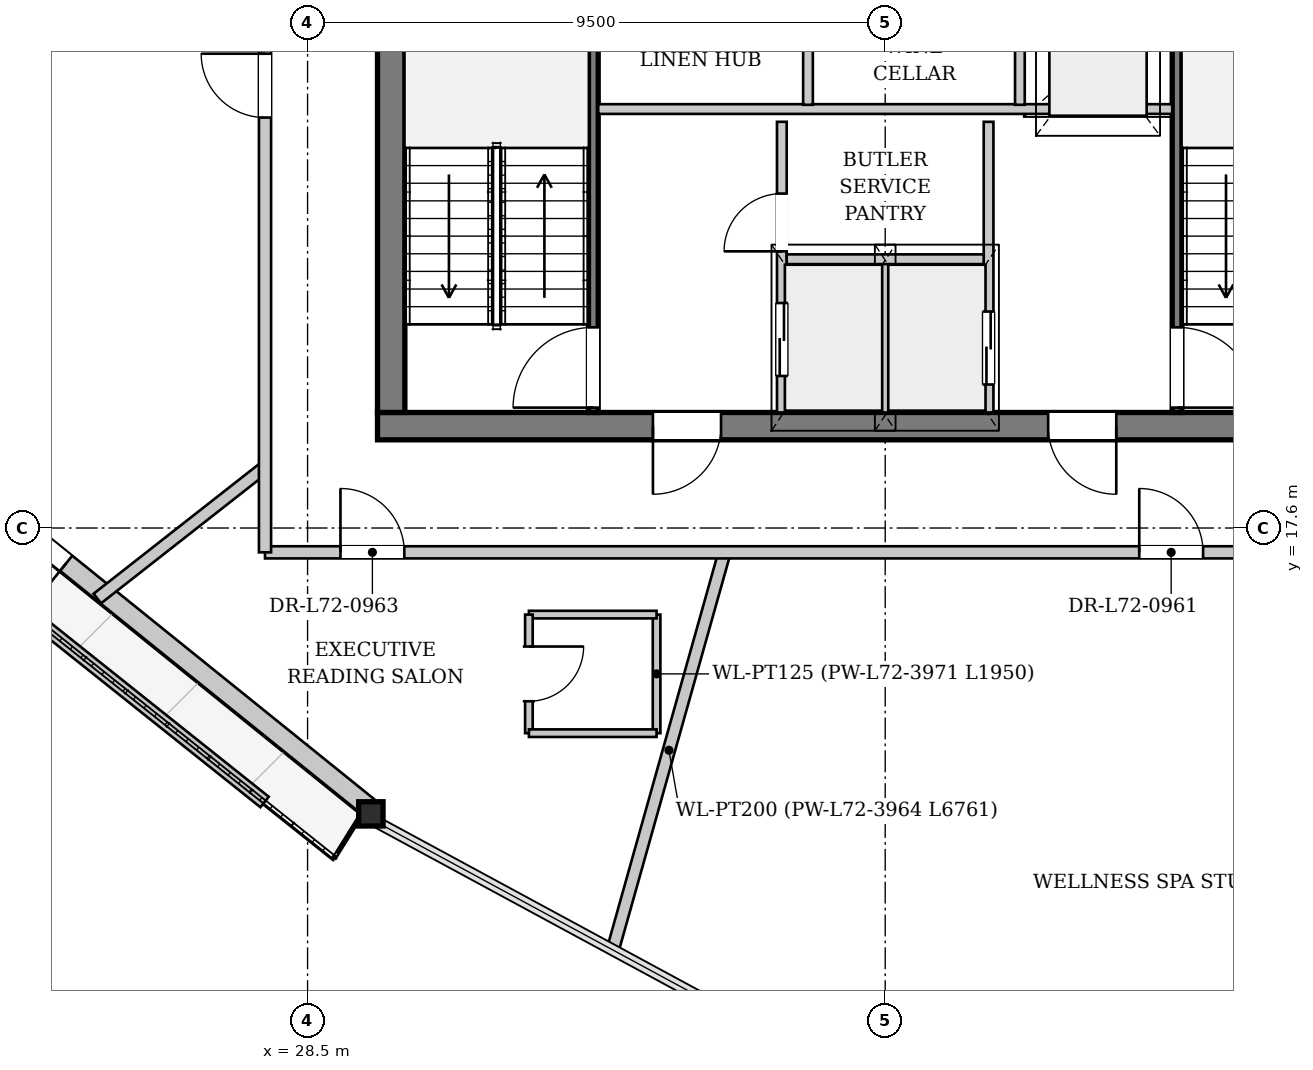
"""IFC4 building model, lengths in metres.
Left out: names, types, materials, properties, quantities, classifications, styles, units other than length and angle.
Written with IfcOpenShell. Run it as: python <this file> out.ifc"""

import sys

from ifc_helpers import new_model, si_unit, direction, frame, frame_2d, origin, origin_2d, place, context, subcontext, project, spatial, rectangle, i_section, extrude, source, transform, mapped, element, fill, save


model = new_model("IFC4")
c1 = context("Model", 3, precision=1e-05, world=origin(), true_north=direction((0.0, 1.0)))
c2 = subcontext(c1, "Body", "Model", "MODEL_VIEW")
j1 = project(units=[si_unit("LENGTHUNIT", "METRE"), si_unit("PLANEANGLEUNIT", "RADIAN")], contexts=[c1])
p1 = place(None, origin())
s1 = spatial("IfcSite", under=j1, at=p1, CompositionType="ELEMENT")
p2 = place(p1, origin())
s2 = spatial("IfcBuilding", under=s1, at=p2, CompositionType="ELEMENT")
p3 = place(p2, frame((0.0, 0.0, 270.5)))
s3 = spatial("IfcBuildingStorey", under=s2, at=p3, CompositionType="ELEMENT", Elevation=270.5)
m1 = source(origin(), c2, "Body", "SweptSolid", [
    extrude(i_section(OverallWidth=0.401, OverallDepth=0.399, WebThickness=0.022, FlangeThickness=0.034, at=origin_2d()), origin(), (0.0, 0.0, 1.0), 3.448),
])
p4 = place(p3, frame((29.39, 12.896, 0.0), z_axis=(0.08750935927, 0.001628410407, 0.996162366444), x_axis=(-0.018605193279, 0.999826908411, 0.0)))
e1 = element("IfcColumn", 1, at=p4, inside=s3, PredefinedType="COLUMN", context=c2, shape_type="MappedRepresentation", body=[
    mapped(m1, transform((0.0, 0.0, 0.0), x_axis=(1.0, 0.0, 0.0), y_axis=(0.0, 1.0, 0.0), z_axis=(0.0, 0.0, 1.0), scale=1.0)),
])
p5 = place(p3, frame((29.49, 13.021, 0.0), z_axis=(0.0, 0.0, 1.0), x_axis=(-0.778476594197, 0.627673635169, 0.0)))
e2 = element("IfcWall", 2, at=p5, inside=s3, PredefinedType="SOLIDWALL", context=c2, shape_type="SweptSolid", body=[
    extrude(rectangle(XDim=17.256, YDim=0.32, at=frame_2d((8.628, 0.0))), origin(), (0.0, 0.0, 1.0), 2.872),
])
p6 = place(p5, frame((6.372, 0.0, 0.0)))
e3 = element("IfcOpeningElement", 3, at=p6, cuts=e2, PredefinedType="OPENING", context=c2, shape_type="SweptSolid", body=[
    extrude(rectangle(XDim=1.5, YDim=2.3, at=frame_2d((0.75, 1.15))), frame((0.0, 0.17, 0.0), z_axis=(0.0, -1.0, 0.0), x_axis=(1.0, 0.0, 0.0)), (0.0, 0.0, 1.0), 0.34),
])
p7 = place(p5, frame((11.47, 0.0, 0.402)))
e4 = element("IfcOpeningElement", 4, at=p7, cuts=e2, PredefinedType="OPENING", context=c2, shape_type="SweptSolid", body=[
    extrude(rectangle(XDim=2.6, YDim=2.35, at=frame_2d((1.3, 1.175))), frame((0.0, 0.17, 0.0), z_axis=(0.0, -1.0, 0.0), x_axis=(1.0, 0.0, 0.0)), (0.0, 0.0, 1.0), 0.34),
])
p8 = place(p3, frame((15.729, 22.711, 0.0), z_axis=(0.0, 0.0, 1.0), x_axis=(0.781937578539, -0.623356738368, 0.0)))
e5 = element("IfcWall", 5, at=p8, inside=s3, PredefinedType="PARAPET", context=c2, shape_type="SweptSolid", body=[
    extrude(rectangle(XDim=15.428, YDim=0.22, at=frame_2d((7.714, 0.0))), origin(), (0.0, 0.0, 1.0), 0.3),
])
p9 = place(p3, frame((46.35, 19.275, 0.0), z_axis=(0.0, 0.0, 1.0), x_axis=(-1.0, 0.0, 0.0)))
e6 = element("IfcWall", 6, at=p9, inside=s3, PredefinedType="SHEAR", context=c2, shape_type="SweptSolid", body=[
    extrude(rectangle(XDim=16.7, YDim=0.45, at=frame_2d((8.35, 0.0))), origin(), (0.0, 0.0, 1.0), 3.38),
])
p10 = place(p9, frame((4.55, 0.0, 0.0)))
e7 = element("IfcOpeningElement", 7, at=p10, cuts=e6, PredefinedType="OPENING", context=c2, shape_type="SweptSolid", body=[
    extrude(rectangle(XDim=1.12, YDim=2.25, at=frame_2d((0.56, 1.125))), frame((0.0, 0.235, 0.0), z_axis=(0.0, -1.0, 0.0), x_axis=(1.0, 0.0, 0.0)), (0.0, 0.0, 1.0), 0.47),
])
p11 = place(p9, frame((11.05, 0.0, 0.0)))
e8 = element("IfcOpeningElement", 8, at=p11, cuts=e6, PredefinedType="OPENING", context=c2, shape_type="SweptSolid", body=[
    extrude(rectangle(XDim=1.12, YDim=2.25, at=frame_2d((0.56, 1.125))), frame((0.0, 0.235, 0.0), z_axis=(0.0, -1.0, 0.0), x_axis=(1.0, 0.0, 0.0)), (0.0, 0.0, 1.0), 0.47),
])
p12 = place(p3, frame((29.875, 19.5, 0.0), z_axis=(0.0, 0.0, 1.0), x_axis=(0.0, 1.0, 0.0)))
e9 = element("IfcWall", 9, at=p12, inside=s3, PredefinedType="SHEAR", context=c2, shape_type="SweptSolid", body=[
    extrude(rectangle(XDim=14.2, YDim=0.45, at=frame_2d((7.1, 0.0))), origin(), (0.0, 0.0, 1.0), 3.38),
])
p13 = place(p12, frame((7.42, 0.0, 0.0)))
e10 = element("IfcOpeningElement", 10, at=p13, cuts=e9, PredefinedType="OPENING", context=c2, shape_type="SweptSolid", body=[
    extrude(rectangle(XDim=1.6, YDim=2.2, at=frame_2d((0.8, 1.1))), frame((0.0, 0.235, 0.0), z_axis=(0.0, -1.0, 0.0), x_axis=(1.0, 0.0, 0.0)), (0.0, 0.0, 1.0), 0.47),
])
p14 = place(p3, frame((33.2, 19.5, 0.0), z_axis=(0.0, 0.0, 1.0), x_axis=(0.0, 1.0, 0.0)))
e11 = element("IfcWall", 11, at=p14, inside=s3, PredefinedType="PARTITIONING", context=c2, shape_type="SweptSolid", body=[
    extrude(rectangle(XDim=7.46, YDim=0.16, at=frame_2d((3.73, 0.0))), origin(), (0.0, 0.0, 1.0), 3.38),
])
p15 = place(p14, frame((0.08, 0.0, 0.0)))
e12 = element("IfcOpeningElement", 12, at=p15, cuts=e11, PredefinedType="OPENING", context=c2, shape_type="SweptSolid", body=[
    extrude(rectangle(XDim=1.32, YDim=2.2, at=frame_2d((0.66, 1.1))), frame((0.0, 0.09, 0.0), z_axis=(0.0, -1.0, 0.0), x_axis=(1.0, 0.0, 0.0)), (0.0, 0.0, 1.0), 0.18),
])
p16 = place(p3, frame((42.8, 26.96, 0.0), z_axis=(0.0, 0.0, 1.0), x_axis=(0.0, -1.0, 0.0)))
e13 = element("IfcWall", 13, at=p16, inside=s3, PredefinedType="PARTITIONING", context=c2, shape_type="SweptSolid", body=[
    extrude(rectangle(XDim=7.46, YDim=0.16, at=frame_2d((3.73, 0.0))), origin(), (0.0, 0.0, 1.0), 3.38),
])
p17 = place(p16, frame((6.06, 0.0, 0.0)))
e14 = element("IfcOpeningElement", 14, at=p17, cuts=e13, PredefinedType="OPENING", context=c2, shape_type="SweptSolid", body=[
    extrude(rectangle(XDim=1.32, YDim=2.2, at=frame_2d((0.66, 1.1))), frame((0.0, 0.09, 0.0), z_axis=(0.0, -1.0, 0.0), x_axis=(1.0, 0.0, 0.0)), (0.0, 0.0, 1.0), 0.18),
])
p18 = place(p3, frame((36.3, 19.5, 0.0), z_axis=(0.0, 0.0, 1.0), x_axis=(0.0, 1.0, 0.0)))
e15 = element("IfcWall", 15, at=p18, inside=s3, PredefinedType="PARTITIONING", context=c2, shape_type="SweptSolid", body=[
    extrude(rectangle(XDim=4.78, YDim=0.16, at=frame_2d((2.39, 0.0))), origin(), (0.0, 0.0, 1.0), 3.38),
])
p19 = place(p18, frame((0.6, 0.0, 0.0)))
e16 = element("IfcOpeningElement", 16, at=p19, cuts=e15, PredefinedType="OPENING", context=c2, shape_type="SweptSolid", body=[
    extrude(rectangle(XDim=1.2, YDim=2.2, at=frame_2d((0.6, 1.1))), frame((0.0, 0.09, 0.0), z_axis=(0.0, -1.0, 0.0), x_axis=(1.0, 0.0, 0.0)), (0.0, 0.0, 1.0), 0.18),
])
p20 = place(p18, frame((2.65, 0.0, 0.0)))
e17 = element("IfcOpeningElement", 17, at=p20, cuts=e15, PredefinedType="OPENING", context=c2, shape_type="SweptSolid", body=[
    extrude(rectangle(XDim=0.95, YDim=2.1, at=frame_2d((0.475, 1.05))), frame((0.0, 0.09, 0.0), z_axis=(0.0, -1.0, 0.0), x_axis=(1.0, 0.0, 0.0)), (0.0, 0.0, 1.0), 0.18),
])
p21 = place(p3, frame((39.7, 24.28, 0.0), z_axis=(0.0, 0.0, 1.0), x_axis=(0.0, -1.0, 0.0)))
e18 = element("IfcWall", 18, at=p21, inside=s3, PredefinedType="PARTITIONING", context=c2, shape_type="SweptSolid", body=[
    extrude(rectangle(XDim=4.78, YDim=0.16, at=frame_2d((2.39, 0.0))), origin(), (0.0, 0.0, 1.0), 3.38),
])
p22 = place(p21, frame((3.12, 0.0, 0.0)))
e19 = element("IfcOpeningElement", 19, at=p22, cuts=e18, PredefinedType="OPENING", context=c2, shape_type="SweptSolid", body=[
    extrude(rectangle(XDim=1.2, YDim=2.2, at=frame_2d((0.6, 1.1))), frame((0.0, 0.09, 0.0), z_axis=(0.0, -1.0, 0.0), x_axis=(1.0, 0.0, 0.0)), (0.0, 0.0, 1.0), 0.18),
])
p23 = place(p3, frame((38.0, 19.5, 0.0), z_axis=(0.0, 0.0, 1.0), x_axis=(0.0, 1.0, 0.0)))
e20 = element("IfcWall", 20, at=p23, inside=s3, PredefinedType="PARTITIONING", context=c2, shape_type="SweptSolid", body=[
    extrude(rectangle(XDim=2.46, YDim=0.125, at=frame_2d((1.23, 0.0))), origin(), (0.0, 0.0, 1.0), 3.38),
])
p24 = place(p3, frame((36.38, 22.02, 0.0), z_axis=(0.0, 0.0, 1.0), x_axis=(1.0, 0.0, 0.0)))
e21 = element("IfcWall", 21, at=p24, inside=s3, PredefinedType="PARTITIONING", context=c2, shape_type="SweptSolid", body=[
    extrude(rectangle(XDim=3.24, YDim=0.16, at=frame_2d((1.62, 0.0))), origin(), (0.0, 0.0, 1.0), 3.38),
])
p25 = place(p3, frame((33.28, 24.49, 0.0), z_axis=(0.0, 0.0, 1.0), x_axis=(1.0, 0.0, 0.0)))
e22 = element("IfcWall", 22, at=p25, inside=s3, PredefinedType="PARTITIONING", context=c2, shape_type="SweptSolid", body=[
    extrude(rectangle(XDim=9.44, YDim=0.16, at=frame_2d((4.72, 0.0))), origin(), (0.0, 0.0, 1.0), 3.38),
])
for number, where, z_axis, x_axis in (
    (23, (36.73, 24.56, 0.0), (0.0, 0.0, 1.0), (0.0, 1.0, 0.0)),
    (24, (40.215, 24.56, 0.0), (0.0, 0.0, 1.0), (0.0, 1.0, 0.0)),
):
    element("IfcWall", number, at=place(p3, frame(where, z_axis=z_axis, x_axis=x_axis)), inside=s3, PredefinedType="PARTITIONING", context=c2, shape_type="SweptSolid", body=[
        extrude(rectangle(XDim=2.31, YDim=0.16, at=frame_2d((1.155, 0.0))), origin(), (0.0, 0.0, 1.0), 3.38),
    ])
p26 = place(p3, frame((35.358, 17.2, 0.0), z_axis=(0.0, 0.0, 1.0), x_axis=(-0.270598132861, -0.962692396611, 0.0)))
e25 = element("IfcWall", 25, at=p26, inside=s3, PredefinedType="PARTITIONING", context=c2, shape_type="SweptSolid", body=[
    extrude(rectangle(XDim=6.761, YDim=0.2, at=frame_2d((3.381, 0.0))), origin(), (0.0, 0.0, 1.0), 3.38),
])
p27 = place(p3, frame((27.8, 18.603, 0.0), z_axis=(0.0, 0.0, 1.0), x_axis=(-0.786941631294, -0.617027445854, 0.0)))
e26 = element("IfcWall", 26, at=p27, inside=s3, PredefinedType="PARTITIONING", context=c2, shape_type="SweptSolid", body=[
    extrude(rectangle(XDim=3.504, YDim=0.2, at=frame_2d((1.752, 0.0))), origin(), (0.0, 0.0, 1.0), 3.38),
])
p28 = place(p3, frame((34.24, 14.226, 0.0), z_axis=(0.0, 0.0, 1.0), x_axis=(0.0, 1.0, 0.0)))
e27 = element("IfcWall", 27, at=p28, inside=s3, PredefinedType="PARTITIONING", context=c2, shape_type="SweptSolid", body=[
    extrude(rectangle(XDim=1.95, YDim=0.125, at=frame_2d((0.975, 0.0))), origin(), (0.0, 0.0, 1.0), 3.38),
])
p29 = place(p3, frame((34.24, 16.176, 0.0), z_axis=(0.0, 0.0, 1.0), x_axis=(-1.0, 0.0, 0.0)))
e28 = element("IfcWall", 28, at=p29, inside=s3, PredefinedType="PARTITIONING", context=c2, shape_type="SweptSolid", body=[
    extrude(rectangle(XDim=2.1, YDim=0.125, at=frame_2d((1.05, 0.0))), origin(), (0.0, 0.0, 1.0), 3.38),
])
p30 = place(p3, frame((32.14, 16.176, 0.0), z_axis=(0.0, 0.0, 1.0), x_axis=(0.0, -1.0, 0.0)))
e29 = element("IfcWall", 29, at=p30, inside=s3, PredefinedType="PARTITIONING", context=c2, shape_type="SweptSolid", body=[
    extrude(rectangle(XDim=1.95, YDim=0.125, at=frame_2d((0.975, 0.0))), origin(), (0.0, 0.0, 1.0), 3.38),
])
p31 = place(p30, frame((0.525, 0.0, 0.0)))
e30 = element("IfcOpeningElement", 30, at=p31, cuts=e29, PredefinedType="OPENING", context=c2, shape_type="SweptSolid", body=[
    extrude(rectangle(XDim=0.9, YDim=2.1, at=frame_2d((0.45, 1.05))), frame((0.0, 0.073, 0.0), z_axis=(0.0, -1.0, 0.0), x_axis=(1.0, 0.0, 0.0)), (0.0, 0.0, 1.0), 0.145),
])
p32 = place(p3, frame((32.14, 14.226, 0.0), z_axis=(0.0, 0.0, 1.0), x_axis=(1.0, 0.0, 0.0)))
e31 = element("IfcWall", 31, at=p32, inside=s3, PredefinedType="PARTITIONING", context=c2, shape_type="SweptSolid", body=[
    extrude(rectangle(XDim=2.1, YDim=0.125, at=frame_2d((1.05, 0.0))), origin(), (0.0, 0.0, 1.0), 3.38),
])
p33 = place(p3, frame((27.8, 17.2, 0.0), z_axis=(0.0, 0.0, 1.0), x_axis=(1.0, 0.0, 0.0)))
e32 = element("IfcWall", 32, at=p33, inside=s3, PredefinedType="PARTITIONING", context=c2, shape_type="SweptSolid", body=[
    extrude(rectangle(XDim=20.4, YDim=0.2, at=frame_2d((10.2, 0.0))), origin(), (0.0, 0.0, 1.0), 3.38),
])
p34 = place(p33, frame((14.378, 0.0, 0.0)))
e33 = element("IfcOpeningElement", 33, at=p34, cuts=e32, PredefinedType="OPENING", context=c2, shape_type="SweptSolid", body=[
    extrude(rectangle(XDim=1.05, YDim=2.2, at=frame_2d((0.525, 1.1))), frame((0.0, 0.11, 0.0), z_axis=(0.0, -1.0, 0.0), x_axis=(1.0, 0.0, 0.0)), (0.0, 0.0, 1.0), 0.22),
])
p35 = place(p33, frame((19.05, 0.0, 0.0)))
e34 = element("IfcOpeningElement", 34, at=p35, cuts=e32, PredefinedType="OPENING", context=c2, shape_type="SweptSolid", body=[
    extrude(rectangle(XDim=1.05, YDim=2.2, at=frame_2d((0.525, 1.1))), frame((0.0, 0.11, 0.0), z_axis=(0.0, -1.0, 0.0), x_axis=(1.0, 0.0, 0.0)), (0.0, 0.0, 1.0), 0.22),
])
p36 = place(p33, frame((1.241, 0.0, 0.0)))
e35 = element("IfcOpeningElement", 35, at=p36, cuts=e32, PredefinedType="OPENING", context=c2, shape_type="SweptSolid", body=[
    extrude(rectangle(XDim=1.05, YDim=2.2, at=frame_2d((0.525, 1.1))), frame((0.0, 0.11, 0.0), z_axis=(0.0, -1.0, 0.0), x_axis=(1.0, 0.0, 0.0)), (0.0, 0.0, 1.0), 0.22),
])
p37 = place(p3, frame((27.8, 17.2, 0.0), z_axis=(0.0, 0.0, 1.0), x_axis=(0.0, 1.0, 0.0)))
e36 = element("IfcWall", 36, at=p37, inside=s3, PredefinedType="PARTITIONING", context=c2, shape_type="SweptSolid", body=[
    extrude(rectangle(XDim=18.118, YDim=0.2, at=frame_2d((9.059, 0.0))), origin(), (0.0, 0.0, 1.0), 3.38),
])
p38 = place(p37, frame((7.15, 0.0, 0.0)))
e37 = element("IfcOpeningElement", 37, at=p38, cuts=e36, PredefinedType="OPENING", context=c2, shape_type="SweptSolid", body=[
    extrude(rectangle(XDim=1.05, YDim=2.2, at=frame_2d((0.525, 1.1))), frame((0.0, 0.11, 0.0), z_axis=(0.0, -1.0, 0.0), x_axis=(1.0, 0.0, 0.0)), (0.0, 0.0, 1.0), 0.22),
])
m2 = source(origin(), c2, "Body", "SweptSolid", [
    extrude(rectangle(XDim=1.5, YDim=2.3, at=frame_2d((0.75, 1.15))), frame((0.0, 0.025, 0.0), z_axis=(0.0, -1.0, 0.0), x_axis=(1.0, 0.0, 0.0)), (0.0, 0.0, 1.0), 0.05),
])
p39 = place(p6, origin())
e38 = element("IfcDoor", 38, at=p39, inside=s3, OperationType="DOUBLE_DOOR_SINGLE_SWING", PredefinedType="DOOR", context=c2, shape_type="MappedRepresentation", body=[
    mapped(m2, transform((0.0, 0.0, 0.0), x_axis=(1.0, 0.0, 0.0), y_axis=(0.0, 1.0, 0.0), z_axis=(0.0, 0.0, 1.0), scale=1.0)),
])
fill(e3, e38)
m3 = source(origin(), c2, "Body", "SweptSolid", [
    extrude(rectangle(XDim=1.12, YDim=2.25, at=frame_2d((0.56, 1.125))), frame((0.0, 0.025, 0.0), z_axis=(0.0, -1.0, 0.0), x_axis=(1.0, 0.0, 0.0)), (0.0, 0.0, 1.0), 0.05),
])
p40 = place(p10, origin())
e39 = element("IfcDoor", 39, at=p40, inside=s3, OperationType="SINGLE_SWING_LEFT", PredefinedType="DOOR", context=c2, shape_type="MappedRepresentation", body=[
    mapped(m3, transform((0.0, 0.0, 0.0), x_axis=(1.0, 0.0, 0.0), y_axis=(0.0, 1.0, 0.0), z_axis=(0.0, 0.0, 1.0), scale=1.0)),
])
fill(e7, e39)
p41 = place(p11, origin())
e40 = element("IfcDoor", 40, at=p41, inside=s3, OperationType="SINGLE_SWING_RIGHT", PredefinedType="DOOR", context=c2, shape_type="MappedRepresentation", body=[
    mapped(m3, transform((0.0, 0.0, 0.0), x_axis=(1.0, 0.0, 0.0), y_axis=(0.0, 1.0, 0.0), z_axis=(0.0, 0.0, 1.0), scale=1.0)),
])
fill(e8, e40)
m4 = source(origin(), c2, "Body", "SweptSolid", [
    extrude(rectangle(XDim=1.32, YDim=2.2, at=frame_2d((0.66, 1.1))), frame((0.0, 0.025, 0.0), z_axis=(0.0, -1.0, 0.0), x_axis=(1.0, 0.0, 0.0)), (0.0, 0.0, 1.0), 0.05),
])
p42 = place(p15, origin())
e41 = element("IfcDoor", 41, at=p42, inside=s3, OperationType="SINGLE_SWING_LEFT", PredefinedType="DOOR", context=c2, shape_type="MappedRepresentation", body=[
    mapped(m4, transform((0.0, 0.0, 0.0), x_axis=(1.0, 0.0, 0.0), y_axis=(0.0, 1.0, 0.0), z_axis=(0.0, 0.0, 1.0), scale=1.0)),
])
fill(e12, e41)
p43 = place(p17, origin())
e42 = element("IfcDoor", 42, at=p43, inside=s3, OperationType="SINGLE_SWING_RIGHT", PredefinedType="DOOR", context=c2, shape_type="MappedRepresentation", body=[
    mapped(m4, transform((0.0, 0.0, 0.0), x_axis=(1.0, 0.0, 0.0), y_axis=(0.0, 1.0, 0.0), z_axis=(0.0, 0.0, 1.0), scale=1.0)),
])
fill(e14, e42)
m5 = source(origin(), c2, "Body", "SweptSolid", [
    extrude(rectangle(XDim=1.2, YDim=2.2, at=frame_2d((0.6, 1.1))), frame((0.0, 0.025, 0.0), z_axis=(0.0, -1.0, 0.0), x_axis=(1.0, 0.0, 0.0)), (0.0, 0.0, 1.0), 0.05),
])
p44 = place(p19, origin())
e43 = element("IfcDoor", 43, at=p44, inside=s3, OperationType="DOUBLE_DOOR_SLIDING", PredefinedType="DOOR", context=c2, shape_type="MappedRepresentation", body=[
    mapped(m5, transform((0.0, 0.0, 0.0), x_axis=(1.0, 0.0, 0.0), y_axis=(0.0, 1.0, 0.0), z_axis=(0.0, 0.0, 1.0), scale=1.0)),
])
fill(e16, e43)
m6 = source(origin(), c2, "Body", "SweptSolid", [
    extrude(rectangle(XDim=0.95, YDim=2.1, at=frame_2d((0.475, 1.05))), frame((0.0, 0.025, 0.0), z_axis=(0.0, -1.0, 0.0), x_axis=(1.0, 0.0, 0.0)), (0.0, 0.0, 1.0), 0.05),
])
p45 = place(p20, origin())
e44 = element("IfcDoor", 44, at=p45, inside=s3, OperationType="SINGLE_SWING_LEFT", PredefinedType="DOOR", context=c2, shape_type="MappedRepresentation", body=[
    mapped(m6, transform((0.0, 0.0, 0.0), x_axis=(1.0, 0.0, 0.0), y_axis=(0.0, 1.0, 0.0), z_axis=(0.0, 0.0, 1.0), scale=1.0)),
])
fill(e17, e44)
p46 = place(p22, origin())
e45 = element("IfcDoor", 45, at=p46, inside=s3, OperationType="DOUBLE_DOOR_SLIDING", PredefinedType="DOOR", context=c2, shape_type="MappedRepresentation", body=[
    mapped(m5, transform((0.0, 0.0, 0.0), x_axis=(1.0, 0.0, 0.0), y_axis=(0.0, 1.0, 0.0), z_axis=(0.0, 0.0, 1.0), scale=1.0)),
])
fill(e19, e45)
m7 = source(origin(), c2, "Body", "SweptSolid", [
    extrude(rectangle(XDim=0.9, YDim=2.1, at=frame_2d((0.45, 1.05))), frame((0.0, 0.025, 0.0), z_axis=(0.0, -1.0, 0.0), x_axis=(1.0, 0.0, 0.0)), (0.0, 0.0, 1.0), 0.05),
])
p47 = place(p31, origin())
e46 = element("IfcDoor", 46, at=p47, inside=s3, OperationType="SINGLE_SWING_LEFT", PredefinedType="DOOR", context=c2, shape_type="MappedRepresentation", body=[
    mapped(m7, transform((0.0, 0.0, 0.0), x_axis=(1.0, 0.0, 0.0), y_axis=(0.0, 1.0, 0.0), z_axis=(0.0, 0.0, 1.0), scale=1.0)),
])
fill(e30, e46)
m8 = source(origin(), c2, "Body", "SweptSolid", [
    extrude(rectangle(XDim=1.05, YDim=2.2, at=frame_2d((0.525, 1.1))), frame((0.0, 0.025, 0.0), z_axis=(0.0, -1.0, 0.0), x_axis=(1.0, 0.0, 0.0)), (0.0, 0.0, 1.0), 0.05),
])
p48 = place(p34, origin())
e47 = element("IfcDoor", 47, at=p48, inside=s3, OperationType="SINGLE_SWING_LEFT", PredefinedType="DOOR", context=c2, shape_type="MappedRepresentation", body=[
    mapped(m8, transform((0.0, 0.0, 0.0), x_axis=(1.0, 0.0, 0.0), y_axis=(0.0, 1.0, 0.0), z_axis=(0.0, 0.0, 1.0), scale=1.0)),
])
fill(e33, e47)
p49 = place(p36, origin())
e48 = element("IfcDoor", 48, at=p49, inside=s3, OperationType="SINGLE_SWING_LEFT", PredefinedType="DOOR", context=c2, shape_type="MappedRepresentation", body=[
    mapped(m8, transform((0.0, 0.0, 0.0), x_axis=(1.0, 0.0, 0.0), y_axis=(0.0, 1.0, 0.0), z_axis=(0.0, 0.0, 1.0), scale=1.0)),
])
fill(e35, e48)
p50 = place(p38, origin())
e49 = element("IfcDoor", 49, at=p50, inside=s3, OperationType="SINGLE_SWING_RIGHT", PredefinedType="DOOR", context=c2, shape_type="MappedRepresentation", body=[
    mapped(m8, transform((0.0, 0.0, 0.0), x_axis=(1.0, 0.0, 0.0), y_axis=(0.0, 1.0, 0.0), z_axis=(0.0, 0.0, 1.0), scale=1.0)),
])
fill(e37, e49)
save(model, sys.argv[1])
